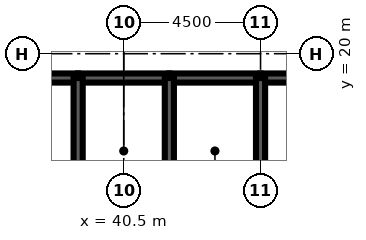
"""IFC4 building model, lengths in metres.
Left out: names, types, materials, properties, quantities, classifications, styles, units other than length and angle.
Written with IfcOpenShell. Run it as: python <this file> out.ifc"""

import sys

from ifc_helpers import new_model, si_unit, direction, frame, frame_2d, origin, place, context, subcontext, project, spatial, rectangle, extrude, element, fill, save


model = new_model("IFC4")
c1 = context("Model", 3, precision=1e-05, world=origin(), true_north=direction((0.0, 1.0)))
c2 = subcontext(c1, "Body", "Model", "MODEL_VIEW")
j1 = project(units=[si_unit("LENGTHUNIT", "METRE"), si_unit("PLANEANGLEUNIT", "RADIAN")], contexts=[c1])
p1 = place(None, origin())
s1 = spatial("IfcSite", under=j1, at=p1, CompositionType="ELEMENT")
p2 = place(p1, origin())
s2 = spatial("IfcBuilding", under=s1, at=p2, CompositionType="ELEMENT")
p3 = place(p2, frame((0.0, 0.0, 223.6)))
s3 = spatial("IfcBuildingStorey", under=s2, at=p3, CompositionType="ELEMENT", Elevation=223.6)
p4 = place(p3, frame((36.0, 19.2, 0.0), z_axis=(0.0, 0.0, 1.0), x_axis=(1.0, 0.0, 0.0)))
e1 = element("IfcWall", 1, at=p4, inside=s3, PredefinedType="SOLIDWALL", context=c2, shape_type="SweptSolid", body=[
    extrude(rectangle(XDim=3.0, YDim=0.3, at=frame_2d((1.5, 0.0))), origin(), (0.0, 0.0, 1.0), 4.2),
])
p5 = place(p4, frame((0.95, 0.0, 0.0)))
e2 = element("IfcOpeningElement", 2, at=p5, cuts=e1, PredefinedType="OPENING", context=c2, shape_type="SweptSolid", body=[
    extrude(rectangle(XDim=1.1, YDim=2.2, at=frame_2d((0.55, 1.1))), frame((0.0, 0.16, 0.0), z_axis=(0.0, -1.0, 0.0), x_axis=(1.0, 0.0, 0.0)), (0.0, 0.0, 1.0), 0.32),
])
p6 = place(p3, frame((39.0, 19.2, 0.0), z_axis=(0.0, 0.0, 1.0), x_axis=(1.0, 0.0, 0.0)))
e3 = element("IfcWall", 3, at=p6, inside=s3, PredefinedType="SOLIDWALL", context=c2, shape_type="SweptSolid", body=[
    extrude(rectangle(XDim=3.0, YDim=0.3, at=frame_2d((1.5, 0.0))), origin(), (0.0, 0.0, 1.0), 4.2),
])
p7 = place(p6, frame((1.0, 0.0, 0.0)))
e4 = element("IfcOpeningElement", 4, at=p7, cuts=e3, PredefinedType="OPENING", context=c2, shape_type="SweptSolid", body=[
    extrude(rectangle(XDim=1.0, YDim=2.1, at=frame_2d((0.5, 1.05))), frame((0.0, 0.16, 0.0), z_axis=(0.0, -1.0, 0.0), x_axis=(1.0, 0.0, 0.0)), (0.0, 0.0, 1.0), 0.32),
])
p8 = place(p3, frame((42.0, 19.2, 0.0), z_axis=(0.0, 0.0, 1.0), x_axis=(1.0, 0.0, 0.0)))
e5 = element("IfcWall", 5, at=p8, inside=s3, PredefinedType="SOLIDWALL", context=c2, shape_type="SweptSolid", body=[
    extrude(rectangle(XDim=3.0, YDim=0.3, at=frame_2d((1.5, 0.0))), origin(), (0.0, 0.0, 1.0), 4.2),
])
p9 = place(p8, frame((1.0, 0.0, 0.0)))
e6 = element("IfcOpeningElement", 6, at=p9, cuts=e5, PredefinedType="OPENING", context=c2, shape_type="SweptSolid", body=[
    extrude(rectangle(XDim=1.0, YDim=2.1, at=frame_2d((0.5, 1.05))), frame((0.0, 0.16, 0.0), z_axis=(0.0, -1.0, 0.0), x_axis=(1.0, 0.0, 0.0)), (0.0, 0.0, 1.0), 0.32),
])
p10 = place(p3, frame((45.0, 19.2, 0.0), z_axis=(0.0, 0.0, 1.0), x_axis=(1.0, 0.0, 0.0)))
e7 = element("IfcWall", 7, at=p10, inside=s3, PredefinedType="SOLIDWALL", context=c2, shape_type="SweptSolid", body=[
    extrude(rectangle(XDim=9.0, YDim=0.3, at=frame_2d((4.5, 0.0))), origin(), (0.0, 0.0, 1.0), 4.2),
])
p11 = place(p10, frame((7.35, 0.0, 0.0)))
e8 = element("IfcOpeningElement", 8, at=p11, cuts=e7, PredefinedType="OPENING", context=c2, shape_type="SweptSolid", body=[
    extrude(rectangle(XDim=1.0, YDim=2.1, at=frame_2d((0.5, 1.05))), frame((0.0, 0.16, 0.0), z_axis=(0.0, -1.0, 0.0), x_axis=(1.0, 0.0, 0.0)), (0.0, 0.0, 1.0), 0.32),
])
for number, where, z_axis, x_axis in (
    (9, (39.0, 16.0, 0.0), (0.0, 0.0, 1.0), (0.0, 1.0, 0.0)),
    (10, (42.0, 16.0, 0.0), (0.0, 0.0, 1.0), (0.0, 1.0, 0.0)),
    (11, (45.0, 16.0, 0.0), (0.0, 0.0, 1.0), (0.0, 1.0, 0.0)),
):
    element("IfcWall", number, at=place(p3, frame(where, z_axis=z_axis, x_axis=x_axis)), inside=s3, PredefinedType="SOLIDWALL", context=c2, shape_type="SweptSolid", body=[
        extrude(rectangle(XDim=3.2, YDim=0.3, at=frame_2d((1.6, 0.0))), origin(), (0.0, 0.0, 1.0), 4.2),
    ])
p12 = place(p3, frame((39.15, 17.35, 0.0), z_axis=(0.0, 0.0, 1.0), x_axis=(1.0, 0.0, 0.0)))
e12 = element("IfcWall", 12, at=p12, inside=s3, PredefinedType="SOLIDWALL", context=c2, shape_type="SweptSolid", body=[
    extrude(rectangle(XDim=2.7, YDim=0.3, at=frame_2d((1.35, 0.0))), origin(), (0.0, 0.0, 1.0), 4.04),
])
p13 = place(p12, frame((0.85, 0.0, 0.0)))
e13 = element("IfcOpeningElement", 13, at=p13, cuts=e12, PredefinedType="OPENING", context=c2, shape_type="SweptSolid", body=[
    extrude(rectangle(XDim=1.0, YDim=2.1, at=frame_2d((0.5, 1.05))), frame((0.0, 0.16, 0.0), z_axis=(0.0, -1.0, 0.0), x_axis=(1.0, 0.0, 0.0)), (0.0, 0.0, 1.0), 0.32),
])
p14 = place(p3, frame((42.15, 17.35, 0.0), z_axis=(0.0, 0.0, 1.0), x_axis=(1.0, 0.0, 0.0)))
e14 = element("IfcWall", 14, at=p14, inside=s3, PredefinedType="SOLIDWALL", context=c2, shape_type="SweptSolid", body=[
    extrude(rectangle(XDim=2.7, YDim=0.3, at=frame_2d((1.35, 0.0))), origin(), (0.0, 0.0, 1.0), 4.04),
])
p15 = place(p14, frame((0.85, 0.0, 0.0)))
e15 = element("IfcOpeningElement", 15, at=p15, cuts=e14, PredefinedType="OPENING", context=c2, shape_type="SweptSolid", body=[
    extrude(rectangle(XDim=1.0, YDim=2.1, at=frame_2d((0.5, 1.05))), frame((0.0, 0.16, 0.0), z_axis=(0.0, -1.0, 0.0), x_axis=(1.0, 0.0, 0.0)), (0.0, 0.0, 1.0), 0.32),
])
p16 = place(p13, origin())
e16 = element("IfcDoor", 16, at=p16, inside=s3, OperationType="SINGLE_SWING_LEFT", PredefinedType="DOOR", context=c2, shape_type="SweptSolid", body=[
    extrude(rectangle(XDim=1.0, YDim=2.1, at=frame_2d((0.5, 1.05))), frame((0.0, 0.025, 0.0), z_axis=(0.0, -1.0, 0.0), x_axis=(1.0, 0.0, 0.0)), (0.0, 0.0, 1.0), 0.05),
])
fill(e13, e16)
p17 = place(p15, origin())
e17 = element("IfcDoor", 17, at=p17, inside=s3, OperationType="SINGLE_SWING_LEFT", PredefinedType="DOOR", context=c2, shape_type="SweptSolid", body=[
    extrude(rectangle(XDim=1.0, YDim=2.1, at=frame_2d((0.5, 1.05))), frame((0.0, 0.025, 0.0), z_axis=(0.0, -1.0, 0.0), x_axis=(1.0, 0.0, 0.0)), (0.0, 0.0, 1.0), 0.05),
])
fill(e15, e17)
p18 = place(p7, origin())
e18 = element("IfcDoor", 18, at=p18, inside=s3, OperationType="SINGLE_SWING_LEFT", PredefinedType="DOOR", context=c2, shape_type="SweptSolid", body=[
    extrude(rectangle(XDim=1.0, YDim=2.1, at=frame_2d((0.5, 1.05))), frame((0.0, 0.025, 0.0), z_axis=(0.0, -1.0, 0.0), x_axis=(1.0, 0.0, 0.0)), (0.0, 0.0, 1.0), 0.05),
])
fill(e4, e18)
p19 = place(p9, origin())
e19 = element("IfcDoor", 19, at=p19, inside=s3, OperationType="SINGLE_SWING_LEFT", PredefinedType="DOOR", context=c2, shape_type="SweptSolid", body=[
    extrude(rectangle(XDim=1.0, YDim=2.1, at=frame_2d((0.5, 1.05))), frame((0.0, 0.025, 0.0), z_axis=(0.0, -1.0, 0.0), x_axis=(1.0, 0.0, 0.0)), (0.0, 0.0, 1.0), 0.05),
])
fill(e6, e19)
save(model, sys.argv[1])
